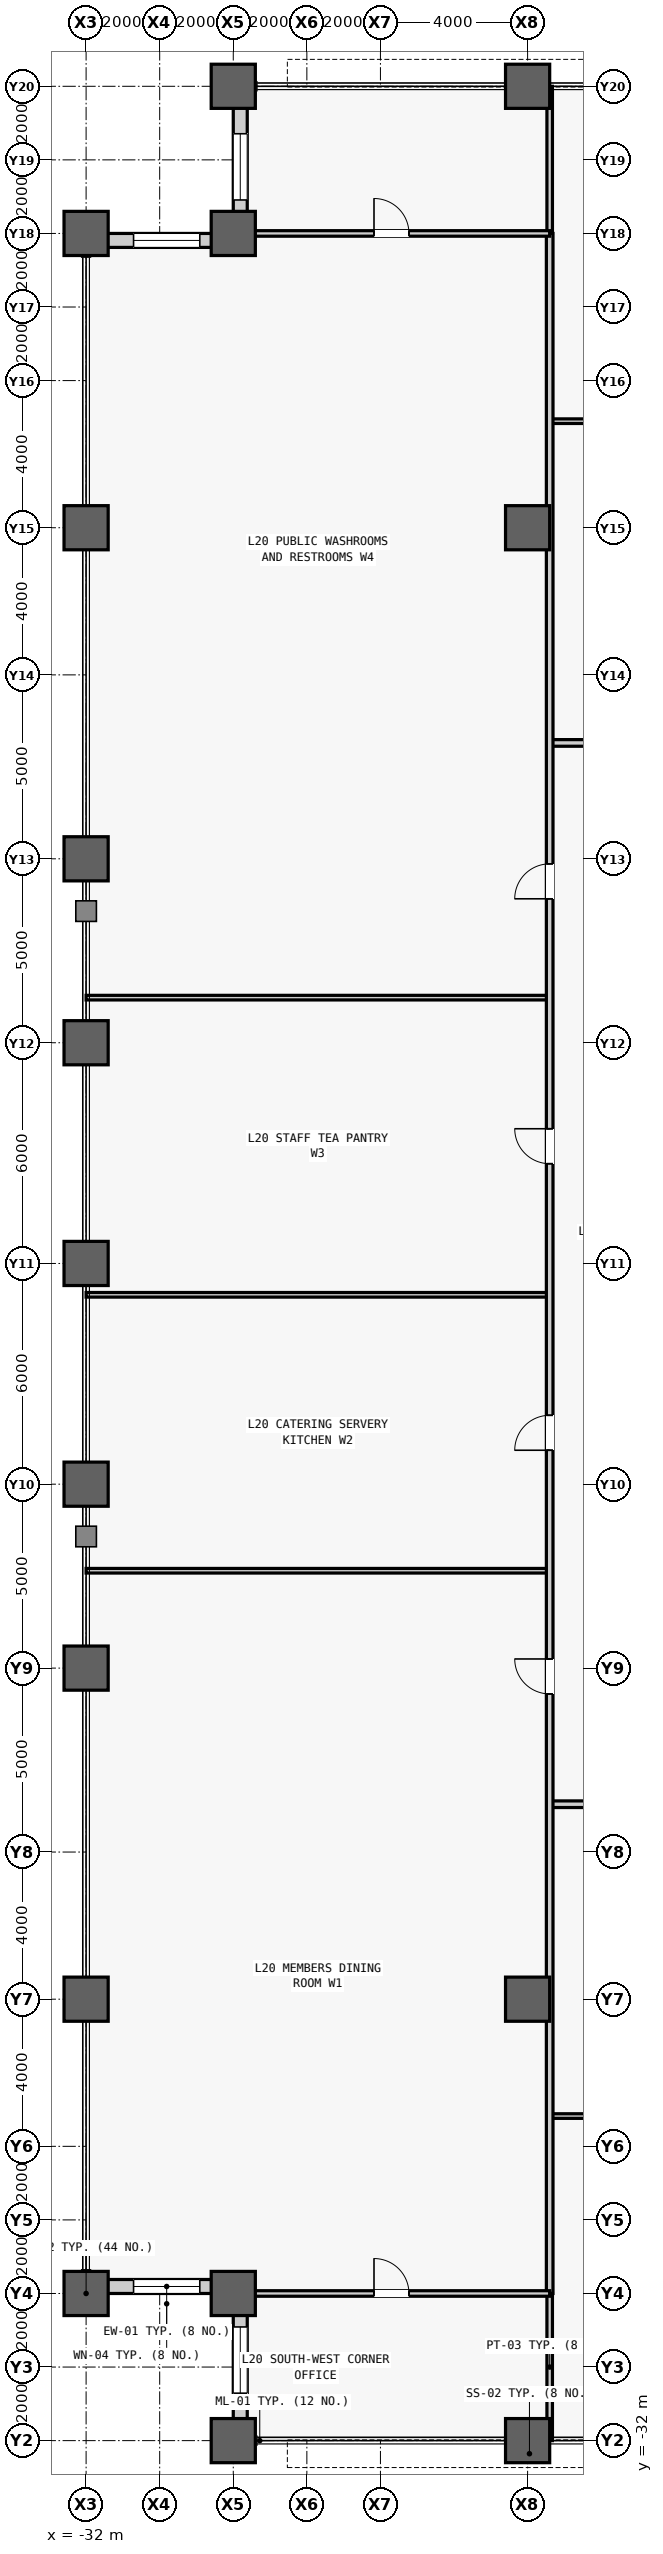
"""IFC4 building model, lengths in metres.
Left out: names, types, materials, properties, quantities, classifications, styles, units other than length and angle.
Written with IfcOpenShell. Run it as: python <this file> out.ifc"""

import sys

from ifc_helpers import new_model, si_unit, direction, frame, frame_2d, origin, origin_2d, place, context, subcontext, project, spatial, rectangle, hollow_rectangle, extrude, source, transform, mapped, element, fill, save


model = new_model("IFC4")
c1 = context("Model", 3, precision=1e-05, world=origin(), true_north=direction((0.0, 1.0)))
c2 = subcontext(c1, "Body", "Model", "MODEL_VIEW")
j1 = project(units=[si_unit("LENGTHUNIT", "METRE"), si_unit("PLANEANGLEUNIT", "RADIAN")], contexts=[c1])
p1 = place(None, origin())
s1 = spatial("IfcSite", under=j1, at=p1, CompositionType="ELEMENT")
p2 = place(p1, origin())
s2 = spatial("IfcBuilding", under=s1, at=p2, CompositionType="ELEMENT")
p3 = place(p2, frame((0.0, 0.0, 91.4)))
s3 = spatial("IfcBuildingStorey", under=s2, at=p3, CompositionType="ELEMENT", Elevation=91.4)
m1 = source(origin(), c2, "Body", "SweptSolid", [
    extrude(hollow_rectangle(XDim=1.2, YDim=1.2, WallThickness=0.07, at=origin_2d()), origin(), (0.0, 0.0, 1.0), 4.1),
])
for number, where, z_axis, x_axis in (
    (1, (-32.0, -28.0, 0.0), (0.0, 0.0, 1.0), (1.0, 0.0, 0.0)),
    (2, (-32.0, -20.0, 0.0), (0.0, 0.0, 1.0), (1.0, 0.0, 0.0)),
    (3, (-32.0, -11.0, 0.0), (0.0, 0.0, 1.0), (1.0, 0.0, 0.0)),
    (4, (-32.0, -6.0, 0.0), (0.0, 0.0, 1.0), (1.0, 0.0, 0.0)),
    (5, (-32.0, 0.0, 0.0), (0.0, 0.0, 1.0), (1.0, 0.0, 0.0)),
    (6, (-32.0, 6.0, 0.0), (0.0, 0.0, 1.0), (1.0, 0.0, 0.0)),
    (7, (-32.0, 11.0, 0.0), (0.0, 0.0, 1.0), (1.0, 0.0, 0.0)),
    (8, (-32.0, 20.0, 0.0), (0.0, 0.0, 1.0), (1.0, 0.0, 0.0)),
    (9, (-32.0, 28.0, 0.0), (0.0, 0.0, 1.0), (1.0, 0.0, 0.0)),
    (10, (-28.0, -32.0, 0.0), (0.0, 0.0, 1.0), (1.0, 0.0, 0.0)),
    (11, (-28.0, -28.0, 0.0), (0.0, 0.0, 1.0), (1.0, 0.0, 0.0)),
    (12, (-28.0, 28.0, 0.0), (0.0, 0.0, 1.0), (1.0, 0.0, 0.0)),
    (13, (-28.0, 32.0, 0.0), (0.0, 0.0, 1.0), (1.0, 0.0, 0.0)),
    (14, (-20.0, -32.0, 0.0), (0.0, 0.0, 1.0), (1.0, 0.0, 0.0)),
    (15, (-20.0, -20.0, 0.0), (0.0, 0.0, 1.0), (1.0, 0.0, 0.0)),
    (16, (-20.0, 20.0, 0.0), (0.0, 0.0, 1.0), (1.0, 0.0, 0.0)),
    (17, (-20.0, 32.0, 0.0), (0.0, 0.0, 1.0), (1.0, 0.0, 0.0)),
):
    element("IfcColumn", number, at=place(p3, frame(where, z_axis=z_axis, x_axis=x_axis)), inside=s3, PredefinedType="COLUMN", context=c2, shape_type="MappedRepresentation", body=[
        mapped(m1, transform((0.0, 0.0, 0.0), scale=1.0)),
    ])
m2 = source(origin(), c2, "Body", "SweptSolid", [
    extrude(rectangle(XDim=3.62, YDim=0.38, at=frame_2d((1.81, 0.0))), origin(), (0.0, 0.0, 1.0), 3.145),
])
p4 = place(p3, frame((-28.0, -27.81, 0.0), z_axis=(0.0, 0.0, 1.0), x_axis=(-1.0, 0.0, 0.0)))
e18 = element("IfcWall", 18, at=p4, inside=s3, PredefinedType="STANDARD", context=c2, shape_type="MappedRepresentation", body=[
    mapped(m2, transform((0.0, 0.0, 0.0), scale=1.0)),
])
m3 = source(origin(), c2, "Body", "SweptSolid", [
    extrude(rectangle(XDim=1.8, YDim=2.4, at=frame_2d((0.9, 1.2))), frame((0.0, 0.2, 0.0), z_axis=(0.0, -1.0, 0.0), x_axis=(1.0, 0.0, 0.0)), (0.0, 0.0, 1.0), 0.4),
])
p5 = place(p4, frame((0.91, 0.0, 0.5)))
e19 = element("IfcOpeningElement", 19, at=p5, cuts=e18, PredefinedType="OPENING", context=c2, shape_type="MappedRepresentation", body=[
    mapped(m3, transform((0.0, 0.0, 0.0), scale=1.0)),
])
p6 = place(p3, frame((-27.81, -31.62, 0.0), z_axis=(0.0, 0.0, 1.0), x_axis=(0.0, 1.0, 0.0)))
e20 = element("IfcWall", 20, at=p6, inside=s3, PredefinedType="STANDARD", context=c2, shape_type="MappedRepresentation", body=[
    mapped(m2, transform((0.0, 0.0, 0.0), scale=1.0)),
])
p7 = place(p6, frame((0.91, 0.0, 0.5)))
e21 = element("IfcOpeningElement", 21, at=p7, cuts=e20, PredefinedType="OPENING", context=c2, shape_type="MappedRepresentation", body=[
    mapped(m3, transform((0.0, 0.0, 0.0), scale=1.0)),
])
p8 = place(p3, frame((-27.81, 28.0, 0.0), z_axis=(0.0, 0.0, 1.0), x_axis=(0.0, 1.0, 0.0)))
e22 = element("IfcWall", 22, at=p8, inside=s3, PredefinedType="STANDARD", context=c2, shape_type="MappedRepresentation", body=[
    mapped(m2, transform((0.0, 0.0, 0.0), scale=1.0)),
])
p9 = place(p8, frame((0.91, 0.0, 0.5)))
e23 = element("IfcOpeningElement", 23, at=p9, cuts=e22, PredefinedType="OPENING", context=c2, shape_type="MappedRepresentation", body=[
    mapped(m3, transform((0.0, 0.0, 0.0), scale=1.0)),
])
p10 = place(p3, frame((-28.0, 27.81, 0.0), z_axis=(0.0, 0.0, 1.0), x_axis=(-1.0, 0.0, 0.0)))
e24 = element("IfcWall", 24, at=p10, inside=s3, PredefinedType="STANDARD", context=c2, shape_type="MappedRepresentation", body=[
    mapped(m2, transform((0.0, 0.0, 0.0), scale=1.0)),
])
p11 = place(p10, frame((0.91, 0.0, 0.5)))
e25 = element("IfcOpeningElement", 25, at=p11, cuts=e24, PredefinedType="OPENING", context=c2, shape_type="MappedRepresentation", body=[
    mapped(m3, transform((0.0, 0.0, 0.0), scale=1.0)),
])
m4 = source(origin(), c2, "Body", "SweptSolid", [
    extrude(rectangle(XDim=37.1, YDim=0.125, at=frame_2d((18.55, 0.0))), origin(), (0.0, 0.0, 1.0), 3.84),
])
p12 = place(p3, frame((-19.4, -23.177, 0.0), z_axis=(0.0, 0.0, 1.0), x_axis=(1.0, 0.0, 0.0)))
e26 = element("IfcWall", 26, at=p12, inside=s3, PredefinedType="PARTITIONING", context=c2, shape_type="MappedRepresentation", body=[
    mapped(m4, transform((0.0, 0.0, 0.0), scale=1.0)),
])
m5 = source(origin(), c2, "Body", "SweptSolid", [
    extrude(rectangle(XDim=0.95, YDim=2.15, at=frame_2d((0.475, 1.075))), frame((0.0, 0.073, 0.0), z_axis=(0.0, -1.0, 0.0), x_axis=(1.0, 0.0, 0.0)), (0.0, 0.0, 1.0), 0.145),
])
p13 = place(p12, frame((18.075, 0.0, 0.0)))
e27 = element("IfcOpeningElement", 27, at=p13, cuts=e26, PredefinedType="OPENING", context=c2, shape_type="MappedRepresentation", body=[
    mapped(m5, transform((0.0, 0.0, 0.0), scale=1.0)),
])
m6 = source(origin(), c2, "Body", "SweptSolid", [
    extrude(rectangle(XDim=37.1, YDim=0.18, at=frame_2d((18.55, 0.0))), origin(), (0.0, 0.0, 1.0), 3.84),
])
p14 = place(p3, frame((-19.4, -14.7, 0.0), z_axis=(0.0, 0.0, 1.0), x_axis=(1.0, 0.0, 0.0)))
e28 = element("IfcWall", 28, at=p14, inside=s3, PredefinedType="PARTITIONING", context=c2, shape_type="MappedRepresentation", body=[
    mapped(m6, transform((0.0, 0.0, 0.0), scale=1.0)),
])
m7 = source(origin(), c2, "Body", "SweptSolid", [
    extrude(rectangle(XDim=1.05, YDim=2.2, at=frame_2d((0.525, 1.1))), frame((0.0, 0.1, 0.0), z_axis=(0.0, -1.0, 0.0), x_axis=(1.0, 0.0, 0.0)), (0.0, 0.0, 1.0), 0.2),
])
p15 = place(p14, frame((18.875, 0.0, 0.0)))
e29 = element("IfcOpeningElement", 29, at=p15, cuts=e28, PredefinedType="OPENING", context=c2, shape_type="MappedRepresentation", body=[
    mapped(m7, transform((0.0, 0.0, 0.0), scale=1.0)),
])
p16 = place(p3, frame((-19.4, 22.896, 0.0), z_axis=(0.0, 0.0, 1.0), x_axis=(1.0, 0.0, 0.0)))
e30 = element("IfcWall", 30, at=p16, inside=s3, PredefinedType="PARTITIONING", context=c2, shape_type="MappedRepresentation", body=[
    mapped(m4, transform((0.0, 0.0, 0.0), scale=1.0)),
])
p17 = place(p16, frame((18.075, 0.0, 0.0)))
e31 = element("IfcOpeningElement", 31, at=p17, cuts=e30, PredefinedType="OPENING", context=c2, shape_type="MappedRepresentation", body=[
    mapped(m5, transform((0.0, 0.0, 0.0), scale=1.0)),
])
p18 = place(p3, frame((-19.4, 14.15, 0.0), z_axis=(0.0, 0.0, 1.0), x_axis=(1.0, 0.0, 0.0)))
e32 = element("IfcWall", 32, at=p18, inside=s3, PredefinedType="PARTITIONING", context=c2, shape_type="MappedRepresentation", body=[
    mapped(m6, transform((0.0, 0.0, 0.0), scale=1.0)),
])
p19 = place(p18, frame((18.875, 0.0, 0.0)))
e33 = element("IfcOpeningElement", 33, at=p19, cuts=e32, PredefinedType="OPENING", context=c2, shape_type="MappedRepresentation", body=[
    mapped(m7, transform((0.0, 0.0, 0.0), scale=1.0)),
])
m8 = source(origin(), c2, "Body", "SweptSolid", [
    extrude(rectangle(XDim=4.0, YDim=0.15, at=frame_2d((2.0, 0.0))), origin(), (0.0, 0.0, 1.0), 3.84),
])
for number, where, z_axis, x_axis in (
    (34, (-19.4, -32.0, 0.0), (0.0, 0.0, 1.0), (0.0, 1.0, 0.0)),
    (35, (-19.4, 28.0, 0.0), (0.0, 0.0, 1.0), (0.0, 1.0, 0.0)),
):
    element("IfcWall", number, at=place(p3, frame(where, z_axis=z_axis, x_axis=x_axis)), inside=s3, PredefinedType="PARTITIONING", context=c2, shape_type="MappedRepresentation", body=[
        mapped(m8, transform((0.0, 0.0, 0.0), scale=1.0)),
    ])
m9 = source(origin(), c2, "Body", "SweptSolid", [
    extrude(rectangle(XDim=12.6, YDim=0.125, at=frame_2d((6.3, 0.0))), origin(), (0.0, 0.0, 1.0), 3.84),
])
for number, where, z_axis, x_axis in (
    (36, (-32.0, -8.353, 0.0), (0.0, 0.0, 1.0), (1.0, 0.0, 0.0)),
    (37, (-32.0, -0.852, 0.0), (0.0, 0.0, 1.0), (1.0, 0.0, 0.0)),
    (38, (-32.0, 7.226, 0.0), (0.0, 0.0, 1.0), (1.0, 0.0, 0.0)),
):
    element("IfcWall", number, at=place(p3, frame(where, z_axis=z_axis, x_axis=x_axis)), inside=s3, PredefinedType="PARTITIONING", context=c2, shape_type="MappedRepresentation", body=[
        mapped(m9, transform((0.0, 0.0, 0.0), scale=1.0)),
    ])
m10 = source(origin(), c2, "Body", "SweptSolid", [
    extrude(rectangle(XDim=56.0, YDim=0.18, at=frame_2d((28.0, 0.0))), origin(), (0.0, 0.0, 1.0), 3.371),
])
p20 = place(p3, frame((-19.4, -28.0, 0.0), z_axis=(0.0, 0.0, 1.0), x_axis=(0.0, 1.0, 0.0)))
e39 = element("IfcWall", 39, at=p20, inside=s3, PredefinedType="PARTITIONING", context=c2, shape_type="MappedRepresentation", body=[
    mapped(m10, transform((0.0, 0.0, 0.0), scale=1.0)),
])
m11 = source(origin(), c2, "Body", "SweptSolid", [
    extrude(rectangle(XDim=0.95, YDim=2.15, at=frame_2d((0.475, 1.075))), frame((0.0, 0.1, 0.0), z_axis=(0.0, -1.0, 0.0), x_axis=(1.0, 0.0, 0.0)), (0.0, 0.0, 1.0), 0.2),
])
p21 = place(p20, frame((16.299, 0.0, 0.0)))
e40 = element("IfcOpeningElement", 40, at=p21, cuts=e39, PredefinedType="OPENING", context=c2, shape_type="MappedRepresentation", body=[
    mapped(m11, transform((0.0, 0.0, 0.0), scale=1.0)),
])
p22 = place(p20, frame((22.923, 0.0, 0.0)))
e41 = element("IfcOpeningElement", 41, at=p22, cuts=e39, PredefinedType="OPENING", context=c2, shape_type="MappedRepresentation", body=[
    mapped(m11, transform((0.0, 0.0, 0.0), scale=1.0)),
])
p23 = place(p20, frame((30.712, 0.0, 0.0)))
e42 = element("IfcOpeningElement", 42, at=p23, cuts=e39, PredefinedType="OPENING", context=c2, shape_type="MappedRepresentation", body=[
    mapped(m11, transform((0.0, 0.0, 0.0), scale=1.0)),
])
p24 = place(p20, frame((37.913, 0.0, 0.0)))
e43 = element("IfcOpeningElement", 43, at=p24, cuts=e39, PredefinedType="OPENING", context=c2, shape_type="MappedRepresentation", body=[
    mapped(m11, transform((0.0, 0.0, 0.0), scale=1.0)),
])
m12 = source(origin(), c2, "Body", "SweptSolid", [
    extrude(rectangle(XDim=8.6, YDim=0.15, at=frame_2d((4.3, 0.0))), origin(), (0.0, 0.0, 1.0), 3.84),
])
p25 = place(p3, frame((-28.0, -28.0, 0.0), z_axis=(0.0, 0.0, 1.0), x_axis=(1.0, 0.0, 0.0)))
e44 = element("IfcWall", 44, at=p25, inside=s3, PredefinedType="PARTITIONING", context=c2, shape_type="MappedRepresentation", body=[
    mapped(m12, transform((0.0, 0.0, 0.0), scale=1.0)),
])
m13 = source(origin(), c2, "Body", "SweptSolid", [
    extrude(rectangle(XDim=0.95, YDim=2.15, at=frame_2d((0.475, 1.075))), frame((0.0, 0.085, 0.0), z_axis=(0.0, -1.0, 0.0), x_axis=(1.0, 0.0, 0.0)), (0.0, 0.0, 1.0), 0.17),
])
p26 = place(p25, frame((3.825, 0.0, 0.0)))
e45 = element("IfcOpeningElement", 45, at=p26, cuts=e44, PredefinedType="OPENING", context=c2, shape_type="MappedRepresentation", body=[
    mapped(m13, transform((0.0, 0.0, 0.0), scale=1.0)),
])
p27 = place(p3, frame((-28.0, 28.0, 0.0), z_axis=(0.0, 0.0, 1.0), x_axis=(1.0, 0.0, 0.0)))
e46 = element("IfcWall", 46, at=p27, inside=s3, PredefinedType="PARTITIONING", context=c2, shape_type="MappedRepresentation", body=[
    mapped(m12, transform((0.0, 0.0, 0.0), scale=1.0)),
])
p28 = place(p27, frame((3.825, 0.0, 0.0)))
e47 = element("IfcOpeningElement", 47, at=p28, cuts=e46, PredefinedType="OPENING", context=c2, shape_type="MappedRepresentation", body=[
    mapped(m13, transform((0.0, 0.0, 0.0), scale=1.0)),
])
m14 = source(origin(), c2, "Body", "SweptSolid", [
    extrude(rectangle(XDim=1.8, YDim=2.4, at=frame_2d((0.9, 1.2))), frame((0.0, 0.03, 0.0), z_axis=(0.0, -1.0, 0.0), x_axis=(1.0, 0.0, 0.0)), (0.0, 0.0, 1.0), 0.06),
])
p29 = place(p5, origin())
e48 = element("IfcWindow", 48, at=p29, inside=s3, PartitioningType="SINGLE_PANEL", PredefinedType="WINDOW", context=c2, shape_type="MappedRepresentation", body=[
    mapped(m14, transform((0.0, 0.0, 0.0), scale=1.0)),
])
fill(e19, e48)
p30 = place(p7, origin())
e49 = element("IfcWindow", 49, at=p30, inside=s3, PartitioningType="SINGLE_PANEL", PredefinedType="WINDOW", context=c2, shape_type="MappedRepresentation", body=[
    mapped(m14, transform((0.0, 0.0, 0.0), scale=1.0)),
])
fill(e21, e49)
p31 = place(p9, origin())
e50 = element("IfcWindow", 50, at=p31, inside=s3, PartitioningType="SINGLE_PANEL", PredefinedType="WINDOW", context=c2, shape_type="MappedRepresentation", body=[
    mapped(m14, transform((0.0, 0.0, 0.0), scale=1.0)),
])
fill(e23, e50)
p32 = place(p11, origin())
e51 = element("IfcWindow", 51, at=p32, inside=s3, PartitioningType="SINGLE_PANEL", PredefinedType="WINDOW", context=c2, shape_type="MappedRepresentation", body=[
    mapped(m14, transform((0.0, 0.0, 0.0), scale=1.0)),
])
fill(e25, e51)
m15 = source(origin(), c2, "Body", "SweptSolid", [
    extrude(rectangle(XDim=0.95, YDim=2.15, at=frame_2d((0.475, 1.075))), frame((0.0, 0.025, 0.0), z_axis=(0.0, -1.0, 0.0), x_axis=(1.0, 0.0, 0.0)), (0.0, 0.0, 1.0), 0.05),
])
p33 = place(p21, origin())
e52 = element("IfcDoor", 52, at=p33, inside=s3, OperationType="SINGLE_SWING_RIGHT", PredefinedType="DOOR", context=c2, shape_type="MappedRepresentation", body=[
    mapped(m15, transform((0.0, 0.0, 0.0), scale=1.0)),
])
fill(e40, e52)
p34 = place(p22, origin())
e53 = element("IfcDoor", 53, at=p34, inside=s3, OperationType="SINGLE_SWING_LEFT", PredefinedType="DOOR", context=c2, shape_type="MappedRepresentation", body=[
    mapped(m15, transform((0.0, 0.0, 0.0), scale=1.0)),
])
fill(e41, e53)
p35 = place(p23, origin())
e54 = element("IfcDoor", 54, at=p35, inside=s3, OperationType="SINGLE_SWING_RIGHT", PredefinedType="DOOR", context=c2, shape_type="MappedRepresentation", body=[
    mapped(m15, transform((0.0, 0.0, 0.0), scale=1.0)),
])
fill(e42, e54)
p36 = place(p24, origin())
e55 = element("IfcDoor", 55, at=p36, inside=s3, OperationType="SINGLE_SWING_LEFT", PredefinedType="DOOR", context=c2, shape_type="MappedRepresentation", body=[
    mapped(m15, transform((0.0, 0.0, 0.0), scale=1.0)),
])
fill(e43, e55)
p37 = place(p26, origin())
e56 = element("IfcDoor", 56, at=p37, inside=s3, OperationType="SINGLE_SWING_LEFT", PredefinedType="DOOR", context=c2, shape_type="MappedRepresentation", body=[
    mapped(m15, transform((0.0, 0.0, 0.0), scale=1.0)),
])
fill(e45, e56)
p38 = place(p28, origin())
e57 = element("IfcDoor", 57, at=p38, inside=s3, OperationType="SINGLE_SWING_LEFT", PredefinedType="DOOR", context=c2, shape_type="MappedRepresentation", body=[
    mapped(m15, transform((0.0, 0.0, 0.0), scale=1.0)),
])
fill(e47, e57)
save(model, sys.argv[1])
